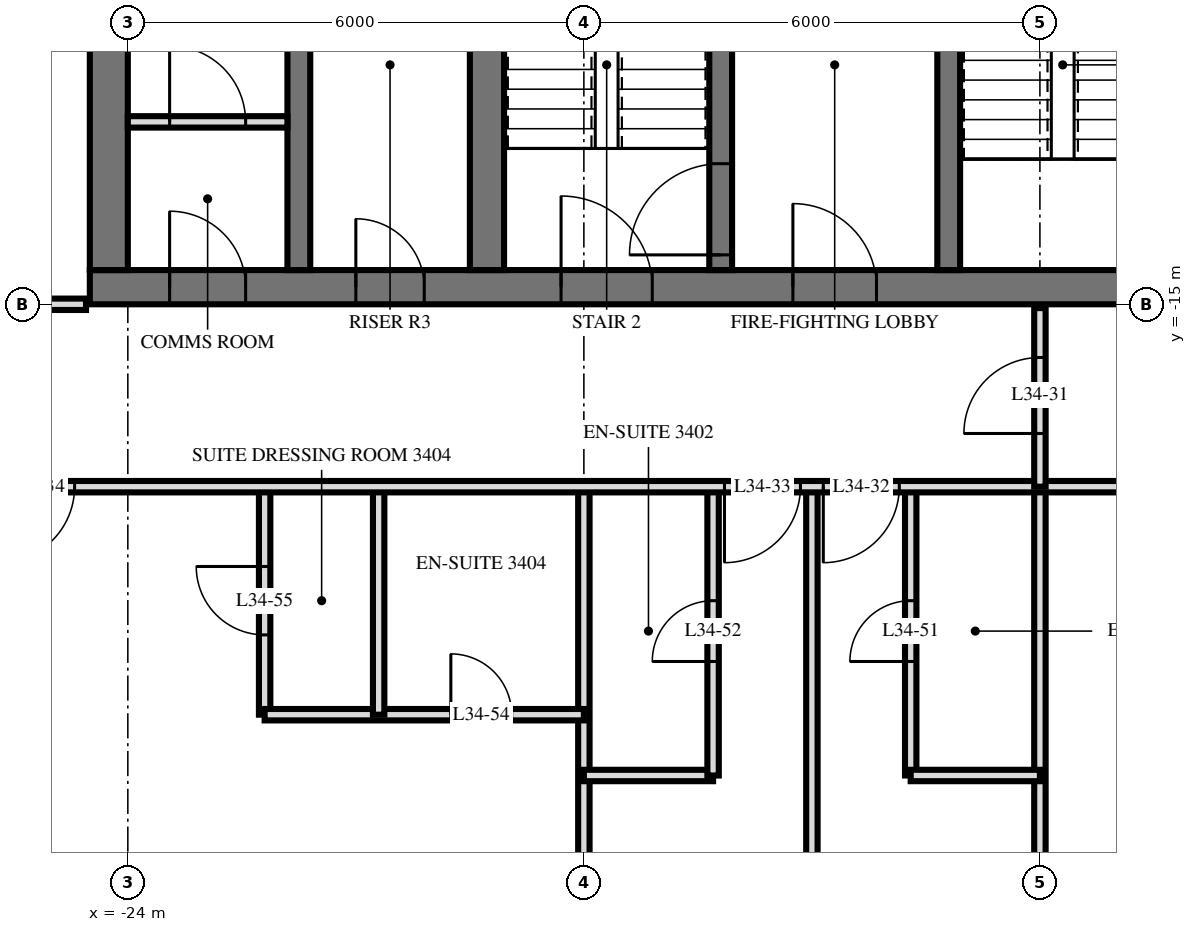
"""IFC4 building model, lengths in metres.
Left out: names, types, materials, properties, quantities, classifications, styles, units other than length and angle.
Written with IfcOpenShell. Run it as: python <this file> out.ifc"""

import sys

from ifc_helpers import new_model, si_unit, direction, frame, frame_2d, origin, place, context, subcontext, project, spatial, rectangle, extrude, element, fill, save


model = new_model("IFC4")
c1 = context("Model", 3, precision=1e-05, world=origin(), true_north=direction((0.0, 1.0)))
c2 = subcontext(c1, "Body", "Model", "MODEL_VIEW")
j1 = project(units=[si_unit("LENGTHUNIT", "METRE"), si_unit("PLANEANGLEUNIT", "RADIAN")], contexts=[c1])
p1 = place(None, origin())
s1 = spatial("IfcSite", under=j1, at=p1, CompositionType="ELEMENT")
p2 = place(p1, origin())
s2 = spatial("IfcBuilding", under=s1, at=p2, CompositionType="ELEMENT")
p3 = place(p2, frame((0.0, 0.0, 134.4)))
s3 = spatial("IfcBuildingStorey", under=s2, at=p3, CompositionType="ELEMENT", Elevation=134.4)
p4 = place(p3, frame((-24.5, -14.775, 0.0), z_axis=(0.0, 0.0, 1.0), x_axis=(1.0, 0.0, 0.0)))
e1 = element("IfcWall", 1, at=p4, inside=s3, PredefinedType="SHEAR", context=c2, shape_type="SweptSolid", body=[
    extrude(rectangle(XDim=14.5, YDim=0.45, at=frame_2d((7.25, 0.0))), origin(), (0.0, 0.0, 1.0), 3.6),
])
p5 = place(p4, frame((6.2, 0.0, 0.0)))
e2 = element("IfcOpeningElement", 2, at=p5, cuts=e1, PredefinedType="OPENING", context=c2, shape_type="SweptSolid", body=[
    extrude(rectangle(XDim=1.2, YDim=2.1, at=frame_2d((0.6, 1.05))), frame((0.0, 0.235, 0.0), z_axis=(0.0, -1.0, 0.0), x_axis=(1.0, 0.0, 0.0)), (0.0, 0.0, 1.0), 0.47),
])
p6 = place(p4, frame((9.25, 0.0, 0.0)))
e3 = element("IfcOpeningElement", 3, at=p6, cuts=e1, PredefinedType="OPENING", context=c2, shape_type="SweptSolid", body=[
    extrude(rectangle(XDim=1.1, YDim=2.1, at=frame_2d((0.55, 1.05))), frame((0.0, 0.235, 0.0), z_axis=(0.0, -1.0, 0.0), x_axis=(1.0, 0.0, 0.0)), (0.0, 0.0, 1.0), 0.47),
])
p7 = place(p4, frame((3.5, 0.0, 0.0)))
e4 = element("IfcOpeningElement", 4, at=p7, cuts=e1, PredefinedType="OPENING", context=c2, shape_type="SweptSolid", body=[
    extrude(rectangle(XDim=0.9, YDim=2.1, at=frame_2d((0.45, 1.05))), frame((0.0, 0.235, 0.0), z_axis=(0.0, -1.0, 0.0), x_axis=(1.0, 0.0, 0.0)), (0.0, 0.0, 1.0), 0.47),
])
p8 = place(p4, frame((1.05, 0.0, 0.0)))
e5 = element("IfcOpeningElement", 5, at=p8, cuts=e1, PredefinedType="OPENING", context=c2, shape_type="SweptSolid", body=[
    extrude(rectangle(XDim=1.0, YDim=2.1, at=frame_2d((0.5, 1.05))), frame((0.0, 0.235, 0.0), z_axis=(0.0, -1.0, 0.0), x_axis=(1.0, 0.0, 0.0)), (0.0, 0.0, 1.0), 0.47),
])
p9 = place(p3, frame((-24.25, -14.55, 0.0), z_axis=(0.0, 0.0, 1.0), x_axis=(0.0, 1.0, 0.0)))
e6 = element("IfcWall", 6, at=p9, inside=s3, PredefinedType="SHEAR", context=c2, shape_type="SweptSolid", body=[
    extrude(rectangle(XDim=14.1, YDim=0.5, at=frame_2d((7.05, 0.0))), origin(), (0.0, 0.0, 1.0), 3.6),
])
p10 = place(p3, frame((-13.2, -14.55, 0.0), z_axis=(0.0, 0.0, 1.0), x_axis=(0.0, 1.0, 0.0)))
e7 = element("IfcWall", 7, at=p10, inside=s3, PredefinedType="SHEAR", context=c2, shape_type="SweptSolid", body=[
    extrude(rectangle(XDim=5.4, YDim=0.3, at=frame_2d((2.7, 0.0))), origin(), (0.0, 0.0, 1.0), 3.6),
])
p11 = place(p10, frame((4.0, 0.0, 0.0)))
e8 = element("IfcOpeningElement", 8, at=p11, cuts=e7, PredefinedType="OPENING", context=c2, shape_type="SweptSolid", body=[
    extrude(rectangle(XDim=1.2, YDim=2.1, at=frame_2d((0.6, 1.05))), frame((0.0, 0.16, 0.0), z_axis=(0.0, -1.0, 0.0), x_axis=(1.0, 0.0, 0.0)), (0.0, 0.0, 1.0), 0.32),
])
p12 = place(p3, frame((-16.2, -14.55, 0.0), z_axis=(0.0, 0.0, 1.0), x_axis=(0.0, 1.0, 0.0)))
e9 = element("IfcWall", 9, at=p12, inside=s3, PredefinedType="SHEAR", context=c2, shape_type="SweptSolid", body=[
    extrude(rectangle(XDim=5.4, YDim=0.3, at=frame_2d((2.7, 0.0))), origin(), (0.0, 0.0, 1.0), 3.6),
])
p13 = place(p12, frame((0.2, 0.0, 0.0)))
e10 = element("IfcOpeningElement", 10, at=p13, cuts=e9, PredefinedType="OPENING", context=c2, shape_type="SweptSolid", body=[
    extrude(rectangle(XDim=1.2, YDim=2.1, at=frame_2d((0.6, 1.05))), frame((0.0, 0.16, 0.0), z_axis=(0.0, -1.0, 0.0), x_axis=(1.0, 0.0, 0.0)), (0.0, 0.0, 1.0), 0.32),
])
p14 = place(p3, frame((-19.275, -14.55, 0.0), z_axis=(0.0, 0.0, 1.0), x_axis=(0.0, 1.0, 0.0)))
e11 = element("IfcWall", 11, at=p14, inside=s3, PredefinedType="SHEAR", context=c2, shape_type="SweptSolid", body=[
    extrude(rectangle(XDim=5.4, YDim=0.45, at=frame_2d((2.7, 0.0))), origin(), (0.0, 0.0, 1.0), 3.6),
])
p15 = place(p3, frame((-21.75, -14.55, 0.0), z_axis=(0.0, 0.0, 1.0), x_axis=(0.0, 1.0, 0.0)))
e12 = element("IfcWall", 12, at=p15, inside=s3, PredefinedType="SHEAR", context=c2, shape_type="SweptSolid", body=[
    extrude(rectangle(XDim=5.4, YDim=0.3, at=frame_2d((2.7, 0.0))), origin(), (0.0, 0.0, 1.0), 3.6),
])
p16 = place(p3, frame((-24.0, -12.6, 0.0), z_axis=(0.0, 0.0, 1.0), x_axis=(1.0, 0.0, 0.0)))
e13 = element("IfcWall", 13, at=p16, inside=s3, PredefinedType="PARTITIONING", context=c2, shape_type="SweptSolid", body=[
    extrude(rectangle(XDim=2.1, YDim=0.15, at=frame_2d((1.05, 0.0))), origin(), (0.0, 0.0, 1.0), 3.3),
])
p17 = place(p16, frame((0.55, 0.0, 0.0)))
e14 = element("IfcOpeningElement", 14, at=p17, cuts=e13, PredefinedType="OPENING", context=c2, shape_type="SweptSolid", body=[
    extrude(rectangle(XDim=1.0, YDim=2.1, at=frame_2d((0.5, 1.05))), frame((0.0, 0.085, 0.0), z_axis=(0.0, -1.0, 0.0), x_axis=(1.0, 0.0, 0.0)), (0.0, 0.0, 1.0), 0.17),
])
p18 = place(p3, frame((-12.0, -17.4, 0.0), z_axis=(0.0, 0.0, 1.0), x_axis=(0.0, 1.0, 0.0)))
e15 = element("IfcWall", 15, at=p18, inside=s3, PredefinedType="PARTITIONING", context=c2, shape_type="SweptSolid", body=[
    extrude(rectangle(XDim=2.35, YDim=0.15, at=frame_2d((1.175, 0.0))), origin(), (0.0, 0.0, 1.0), 3.32),
])
p19 = place(p18, frame((0.7, 0.0, 0.0)))
e16 = element("IfcOpeningElement", 16, at=p19, cuts=e15, PredefinedType="OPENING", context=c2, shape_type="SweptSolid", body=[
    extrude(rectangle(XDim=1.0, YDim=2.1, at=frame_2d((0.5, 1.05))), frame((0.0, 0.085, 0.0), z_axis=(0.0, -1.0, 0.0), x_axis=(1.0, 0.0, 0.0)), (0.0, 0.0, 1.0), 0.17),
])
p20 = place(p3, frame((-12.0, -33.62, 0.0), z_axis=(0.0, 0.0, 1.0), x_axis=(0.0, 1.0, 0.0)))
e17 = element("IfcWall", 17, at=p20, inside=s3, PredefinedType="PARTITIONING", context=c2, shape_type="SweptSolid", body=[
    extrude(rectangle(XDim=16.22, YDim=0.15, at=frame_2d((8.11, 0.0))), origin(), (0.0, 0.0, 1.0), 3.32),
])
p21 = place(p3, frame((-13.7, -21.2, 0.0), z_axis=(0.0, 0.0, 1.0), x_axis=(0.0, 1.0, 0.0)))
e18 = element("IfcWall", 18, at=p21, inside=s3, PredefinedType="PARTITIONING", context=c2, shape_type="SweptSolid", body=[
    extrude(rectangle(XDim=3.8, YDim=0.15, at=frame_2d((1.9, 0.0))), origin(), (0.0, 0.0, 1.0), 3.32),
])
p22 = place(p21, frame((1.5, 0.0, 0.0)))
e19 = element("IfcOpeningElement", 19, at=p22, cuts=e18, PredefinedType="OPENING", context=c2, shape_type="SweptSolid", body=[
    extrude(rectangle(XDim=0.8, YDim=2.1, at=frame_2d((0.4, 1.05))), frame((0.0, 0.085, 0.0), z_axis=(0.0, -1.0, 0.0), x_axis=(1.0, 0.0, 0.0)), (0.0, 0.0, 1.0), 0.17),
])
p23 = place(p3, frame((-15.0, -33.62, 0.0), z_axis=(0.0, 0.0, 1.0), x_axis=(0.0, 1.0, 0.0)))
e20 = element("IfcWall", 20, at=p23, inside=s3, PredefinedType="PARTITIONING", context=c2, shape_type="SweptSolid", body=[
    extrude(rectangle(XDim=16.22, YDim=0.15, at=frame_2d((8.11, 0.0))), origin(), (0.0, 0.0, 1.0), 3.32),
])
p24 = place(p3, frame((-16.3, -21.2, 0.0), z_axis=(0.0, 0.0, 1.0), x_axis=(0.0, 1.0, 0.0)))
e21 = element("IfcWall", 21, at=p24, inside=s3, PredefinedType="PARTITIONING", context=c2, shape_type="SweptSolid", body=[
    extrude(rectangle(XDim=3.8, YDim=0.15, at=frame_2d((1.9, 0.0))), origin(), (0.0, 0.0, 1.0), 3.32),
])
p25 = place(p24, frame((1.5, 0.0, 0.0)))
e22 = element("IfcOpeningElement", 22, at=p25, cuts=e21, PredefinedType="OPENING", context=c2, shape_type="SweptSolid", body=[
    extrude(rectangle(XDim=0.8, YDim=2.1, at=frame_2d((0.4, 1.05))), frame((0.0, 0.085, 0.0), z_axis=(0.0, -1.0, 0.0), x_axis=(1.0, 0.0, 0.0)), (0.0, 0.0, 1.0), 0.17),
])
p26 = place(p3, frame((-18.0, -33.62, 0.0), z_axis=(0.0, 0.0, 1.0), x_axis=(0.0, 1.0, 0.0)))
e23 = element("IfcWall", 23, at=p26, inside=s3, PredefinedType="PARTITIONING", context=c2, shape_type="SweptSolid", body=[
    extrude(rectangle(XDim=16.22, YDim=0.15, at=frame_2d((8.11, 0.0))), origin(), (0.0, 0.0, 1.0), 3.32),
])
p27 = place(p3, frame((-20.7, -20.4, 0.0), z_axis=(0.0, 0.0, 1.0), x_axis=(0.0, 1.0, 0.0)))
e24 = element("IfcWall", 24, at=p27, inside=s3, PredefinedType="PARTITIONING", context=c2, shape_type="SweptSolid", body=[
    extrude(rectangle(XDim=3.0, YDim=0.15, at=frame_2d((1.5, 0.0))), origin(), (0.0, 0.0, 1.0), 3.32),
])
p28 = place(p3, frame((-22.2, -20.4, 0.0), z_axis=(0.0, 0.0, 1.0), x_axis=(0.0, 1.0, 0.0)))
e25 = element("IfcWall", 25, at=p28, inside=s3, PredefinedType="PARTITIONING", context=c2, shape_type="SweptSolid", body=[
    extrude(rectangle(XDim=3.0, YDim=0.15, at=frame_2d((1.5, 0.0))), origin(), (0.0, 0.0, 1.0), 3.32),
])
p29 = place(p28, frame((1.05, 0.0, 0.0)))
e26 = element("IfcOpeningElement", 26, at=p29, cuts=e25, PredefinedType="OPENING", context=c2, shape_type="SweptSolid", body=[
    extrude(rectangle(XDim=0.9, YDim=2.1, at=frame_2d((0.45, 1.05))), frame((0.0, 0.085, 0.0), z_axis=(0.0, -1.0, 0.0), x_axis=(1.0, 0.0, 0.0)), (0.0, 0.0, 1.0), 0.17),
])
for number, where, z_axis, x_axis in (
    (27, (-18.0, -21.2, 0.0), (0.0, 0.0, 1.0), (1.0, 0.0, 0.0)),
    (28, (-13.7, -21.2, 0.0), (0.0, 0.0, 1.0), (1.0, 0.0, 0.0)),
):
    element("IfcWall", number, at=place(p3, frame(where, z_axis=z_axis, x_axis=x_axis)), inside=s3, PredefinedType="PARTITIONING", context=c2, shape_type="SweptSolid", body=[
        extrude(rectangle(XDim=1.7, YDim=0.15, at=frame_2d((0.85, 0.0))), origin(), (0.0, 0.0, 1.0), 3.32),
    ])
p30 = place(p3, frame((-22.2, -20.4, 0.0), z_axis=(0.0, 0.0, 1.0), x_axis=(1.0, 0.0, 0.0)))
e29 = element("IfcWall", 29, at=p30, inside=s3, PredefinedType="PARTITIONING", context=c2, shape_type="SweptSolid", body=[
    extrude(rectangle(XDim=4.2, YDim=0.15, at=frame_2d((2.1, 0.0))), origin(), (0.0, 0.0, 1.0), 3.32),
])
p31 = place(p30, frame((2.45, 0.0, 0.0)))
e30 = element("IfcOpeningElement", 30, at=p31, cuts=e29, PredefinedType="OPENING", context=c2, shape_type="SweptSolid", body=[
    extrude(rectangle(XDim=0.8, YDim=2.1, at=frame_2d((0.4, 1.05))), frame((0.0, 0.085, 0.0), z_axis=(0.0, -1.0, 0.0), x_axis=(1.0, 0.0, 0.0)), (0.0, 0.0, 1.0), 0.17),
])
p32 = place(p3, frame((-28.02, -17.4, 0.0), z_axis=(0.0, 0.0, 1.0), x_axis=(1.0, 0.0, 0.0)))
e31 = element("IfcWall", 31, at=p32, inside=s3, PredefinedType="PARTITIONING", context=c2, shape_type="SweptSolid", body=[
    extrude(rectangle(XDim=56.04, YDim=0.15, at=frame_2d((28.02, 0.0))), origin(), (0.0, 0.0, 1.0), 3.32),
])
p33 = place(p32, frame((13.17, 0.0, 0.0)))
e32 = element("IfcOpeningElement", 32, at=p33, cuts=e31, PredefinedType="OPENING", context=c2, shape_type="SweptSolid", body=[
    extrude(rectangle(XDim=1.0, YDim=2.1, at=frame_2d((0.5, 1.05))), frame((0.0, 0.085, 0.0), z_axis=(0.0, -1.0, 0.0), x_axis=(1.0, 0.0, 0.0)), (0.0, 0.0, 1.0), 0.17),
])
p34 = place(p32, frame((11.87, 0.0, 0.0)))
e33 = element("IfcOpeningElement", 33, at=p34, cuts=e31, PredefinedType="OPENING", context=c2, shape_type="SweptSolid", body=[
    extrude(rectangle(XDim=1.0, YDim=2.1, at=frame_2d((0.5, 1.05))), frame((0.0, 0.085, 0.0), z_axis=(0.0, -1.0, 0.0), x_axis=(1.0, 0.0, 0.0)), (0.0, 0.0, 1.0), 0.17),
])
p35 = place(p32, frame((2.32, 0.0, 0.0)))
e34 = element("IfcOpeningElement", 34, at=p35, cuts=e31, PredefinedType="OPENING", context=c2, shape_type="SweptSolid", body=[
    extrude(rectangle(XDim=1.0, YDim=2.1, at=frame_2d((0.5, 1.05))), frame((0.0, 0.085, 0.0), z_axis=(0.0, -1.0, 0.0), x_axis=(1.0, 0.0, 0.0)), (0.0, 0.0, 1.0), 0.17),
])
p36 = place(p32, frame((40.17, 0.0, 0.0)))
e35 = element("IfcOpeningElement", 35, at=p36, cuts=e31, PredefinedType="OPENING", context=c2, shape_type="SweptSolid", body=[
    extrude(rectangle(XDim=1.0, YDim=2.1, at=frame_2d((0.5, 1.05))), frame((0.0, 0.085, 0.0), z_axis=(0.0, -1.0, 0.0), x_axis=(1.0, 0.0, 0.0)), (0.0, 0.0, 1.0), 0.17),
])
p37 = place(p32, frame((51.22, 0.0, 0.0)))
e36 = element("IfcOpeningElement", 36, at=p37, cuts=e31, PredefinedType="OPENING", context=c2, shape_type="SweptSolid", body=[
    extrude(rectangle(XDim=1.0, YDim=2.1, at=frame_2d((0.5, 1.05))), frame((0.0, 0.085, 0.0), z_axis=(0.0, -1.0, 0.0), x_axis=(1.0, 0.0, 0.0)), (0.0, 0.0, 1.0), 0.17),
])
p38 = place(p32, frame((18.52, 0.0, 0.0)))
e37 = element("IfcOpeningElement", 37, at=p38, cuts=e31, PredefinedType="OPENING", context=c2, shape_type="SweptSolid", body=[
    extrude(rectangle(XDim=1.0, YDim=2.1, at=frame_2d((0.5, 1.05))), frame((0.0, 0.085, 0.0), z_axis=(0.0, -1.0, 0.0), x_axis=(1.0, 0.0, 0.0)), (0.0, 0.0, 1.0), 0.17),
])
p39 = place(p32, frame((26.02, 0.0, 0.0)))
e38 = element("IfcOpeningElement", 38, at=p39, cuts=e31, PredefinedType="OPENING", context=c2, shape_type="SweptSolid", body=[
    extrude(rectangle(XDim=1.0, YDim=2.1, at=frame_2d((0.5, 1.05))), frame((0.0, 0.085, 0.0), z_axis=(0.0, -1.0, 0.0), x_axis=(1.0, 0.0, 0.0)), (0.0, 0.0, 1.0), 0.17),
])
p40 = place(p32, frame((35.02, 0.0, 0.0)))
e39 = element("IfcOpeningElement", 39, at=p40, cuts=e31, PredefinedType="OPENING", context=c2, shape_type="SweptSolid", body=[
    extrude(rectangle(XDim=1.0, YDim=2.1, at=frame_2d((0.5, 1.05))), frame((0.0, 0.085, 0.0), z_axis=(0.0, -1.0, 0.0), x_axis=(1.0, 0.0, 0.0)), (0.0, 0.0, 1.0), 0.17),
])
p41 = place(p3, frame((-28.02, -15.0, 0.0), z_axis=(0.0, 0.0, 1.0), x_axis=(1.0, 0.0, 0.0)))
e40 = element("IfcWall", 40, at=p41, inside=s3, PredefinedType="PARTITIONING", context=c2, shape_type="SweptSolid", body=[
    extrude(rectangle(XDim=3.47, YDim=0.15, at=frame_2d((1.735, 0.0))), origin(), (0.0, 0.0, 1.0), 3.32),
])
p42 = place(p41, frame((1.57, 0.0, 0.0)))
e41 = element("IfcOpeningElement", 41, at=p42, cuts=e40, PredefinedType="OPENING", context=c2, shape_type="SweptSolid", body=[
    extrude(rectangle(XDim=1.0, YDim=2.1, at=frame_2d((0.5, 1.05))), frame((0.0, 0.085, 0.0), z_axis=(0.0, -1.0, 0.0), x_axis=(1.0, 0.0, 0.0)), (0.0, 0.0, 1.0), 0.17),
])
p43 = place(p5, origin())
e42 = element("IfcDoor", 42, at=p43, inside=s3, OperationType="SINGLE_SWING_RIGHT", PredefinedType="DOOR", context=c2, shape_type="SweptSolid", body=[
    extrude(rectangle(XDim=1.2, YDim=2.1, at=frame_2d((0.6, 1.05))), frame((0.0, 0.025, 0.0), z_axis=(0.0, -1.0, 0.0), x_axis=(1.0, 0.0, 0.0)), (0.0, 0.0, 1.0), 0.05),
])
fill(e2, e42)
p44 = place(p6, origin())
e43 = element("IfcDoor", 43, at=p44, inside=s3, OperationType="SINGLE_SWING_RIGHT", PredefinedType="DOOR", context=c2, shape_type="SweptSolid", body=[
    extrude(rectangle(XDim=1.1, YDim=2.1, at=frame_2d((0.55, 1.05))), frame((0.0, 0.025, 0.0), z_axis=(0.0, -1.0, 0.0), x_axis=(1.0, 0.0, 0.0)), (0.0, 0.0, 1.0), 0.05),
])
fill(e3, e43)
p45 = place(p7, origin())
e44 = element("IfcDoor", 44, at=p45, inside=s3, OperationType="SINGLE_SWING_RIGHT", PredefinedType="DOOR", context=c2, shape_type="SweptSolid", body=[
    extrude(rectangle(XDim=0.9, YDim=2.1, at=frame_2d((0.45, 1.05))), frame((0.0, 0.025, 0.0), z_axis=(0.0, -1.0, 0.0), x_axis=(1.0, 0.0, 0.0)), (0.0, 0.0, 1.0), 0.05),
])
fill(e4, e44)
p46 = place(p8, origin())
e45 = element("IfcDoor", 45, at=p46, inside=s3, OperationType="SINGLE_SWING_RIGHT", PredefinedType="DOOR", context=c2, shape_type="SweptSolid", body=[
    extrude(rectangle(XDim=1.0, YDim=2.1, at=frame_2d((0.5, 1.05))), frame((0.0, 0.025, 0.0), z_axis=(0.0, -1.0, 0.0), x_axis=(1.0, 0.0, 0.0)), (0.0, 0.0, 1.0), 0.05),
])
fill(e5, e45)
p47 = place(p13, origin())
e46 = element("IfcDoor", 46, at=p47, inside=s3, OperationType="SINGLE_SWING_RIGHT", PredefinedType="DOOR", context=c2, shape_type="SweptSolid", body=[
    extrude(rectangle(XDim=1.2, YDim=2.1, at=frame_2d((0.6, 1.05))), frame((0.0, 0.025, 0.0), z_axis=(0.0, -1.0, 0.0), x_axis=(1.0, 0.0, 0.0)), (0.0, 0.0, 1.0), 0.05),
])
fill(e10, e46)
p48 = place(p17, origin())
e47 = element("IfcDoor", 47, at=p48, inside=s3, OperationType="SINGLE_SWING_RIGHT", PredefinedType="DOOR", context=c2, shape_type="SweptSolid", body=[
    extrude(rectangle(XDim=1.0, YDim=2.1, at=frame_2d((0.5, 1.05))), frame((0.0, 0.025, 0.0), z_axis=(0.0, -1.0, 0.0), x_axis=(1.0, 0.0, 0.0)), (0.0, 0.0, 1.0), 0.05),
])
fill(e14, e47)
p49 = place(p19, origin())
e48 = element("IfcDoor", 48, at=p49, inside=s3, OperationType="SINGLE_SWING_RIGHT", PredefinedType="DOOR", context=c2, shape_type="SweptSolid", body=[
    extrude(rectangle(XDim=1.0, YDim=2.1, at=frame_2d((0.5, 1.05))), frame((0.0, 0.025, 0.0), z_axis=(0.0, -1.0, 0.0), x_axis=(1.0, 0.0, 0.0)), (0.0, 0.0, 1.0), 0.05),
])
fill(e16, e48)
p50 = place(p33, frame((0.5, 0.0, 0.0), z_axis=(0.0, 0.0, 1.0), x_axis=(-1.0, 0.0, 0.0)))
e49 = element("IfcDoor", 49, at=p50, inside=s3, OperationType="SINGLE_SWING_LEFT", PredefinedType="DOOR", context=c2, shape_type="SweptSolid", body=[
    extrude(rectangle(XDim=1.0, YDim=2.1, at=frame_2d((0.0, 1.05))), frame((0.0, -0.025, 0.0), z_axis=(0.0, 1.0, 0.0), x_axis=(-1.0, 0.0, 0.0)), (0.0, 0.0, 1.0), 0.05),
])
fill(e32, e49)
p51 = place(p34, frame((0.5, 0.0, 0.0), z_axis=(0.0, 0.0, 1.0), x_axis=(-1.0, 0.0, 0.0)))
e50 = element("IfcDoor", 50, at=p51, inside=s3, OperationType="SINGLE_SWING_LEFT", PredefinedType="DOOR", context=c2, shape_type="SweptSolid", body=[
    extrude(rectangle(XDim=1.0, YDim=2.1, at=frame_2d((0.0, 1.05))), frame((0.0, -0.025, 0.0), z_axis=(0.0, 1.0, 0.0), x_axis=(-1.0, 0.0, 0.0)), (0.0, 0.0, 1.0), 0.05),
])
fill(e33, e50)
p52 = place(p35, frame((0.5, 0.0, 0.0), z_axis=(0.0, 0.0, 1.0), x_axis=(-1.0, 0.0, 0.0)))
e51 = element("IfcDoor", 51, at=p52, inside=s3, OperationType="SINGLE_SWING_LEFT", PredefinedType="DOOR", context=c2, shape_type="SweptSolid", body=[
    extrude(rectangle(XDim=1.0, YDim=2.1, at=frame_2d((0.0, 1.05))), frame((0.0, -0.025, 0.0), z_axis=(0.0, 1.0, 0.0), x_axis=(-1.0, 0.0, 0.0)), (0.0, 0.0, 1.0), 0.05),
])
fill(e34, e51)
p53 = place(p22, origin())
e52 = element("IfcDoor", 52, at=p53, inside=s3, OperationType="SINGLE_SWING_RIGHT", PredefinedType="DOOR", context=c2, shape_type="SweptSolid", body=[
    extrude(rectangle(XDim=0.8, YDim=2.1, at=frame_2d((0.4, 1.05))), frame((0.0, 0.025, 0.0), z_axis=(0.0, -1.0, 0.0), x_axis=(1.0, 0.0, 0.0)), (0.0, 0.0, 1.0), 0.05),
])
fill(e19, e52)
p54 = place(p25, origin())
e53 = element("IfcDoor", 53, at=p54, inside=s3, OperationType="SINGLE_SWING_RIGHT", PredefinedType="DOOR", context=c2, shape_type="SweptSolid", body=[
    extrude(rectangle(XDim=0.8, YDim=2.1, at=frame_2d((0.4, 1.05))), frame((0.0, 0.025, 0.0), z_axis=(0.0, -1.0, 0.0), x_axis=(1.0, 0.0, 0.0)), (0.0, 0.0, 1.0), 0.05),
])
fill(e22, e53)
p55 = place(p31, origin())
e54 = element("IfcDoor", 54, at=p55, inside=s3, OperationType="SINGLE_SWING_RIGHT", PredefinedType="DOOR", context=c2, shape_type="SweptSolid", body=[
    extrude(rectangle(XDim=0.8, YDim=2.1, at=frame_2d((0.4, 1.05))), frame((0.0, 0.025, 0.0), z_axis=(0.0, -1.0, 0.0), x_axis=(1.0, 0.0, 0.0)), (0.0, 0.0, 1.0), 0.05),
])
fill(e30, e54)
p56 = place(p29, origin())
e55 = element("IfcDoor", 55, at=p56, inside=s3, OperationType="SINGLE_SWING_LEFT", PredefinedType="DOOR", context=c2, shape_type="SweptSolid", body=[
    extrude(rectangle(XDim=0.9, YDim=2.1, at=frame_2d((0.45, 1.05))), frame((0.0, 0.025, 0.0), z_axis=(0.0, -1.0, 0.0), x_axis=(1.0, 0.0, 0.0)), (0.0, 0.0, 1.0), 0.05),
])
fill(e26, e55)
save(model, sys.argv[1])
